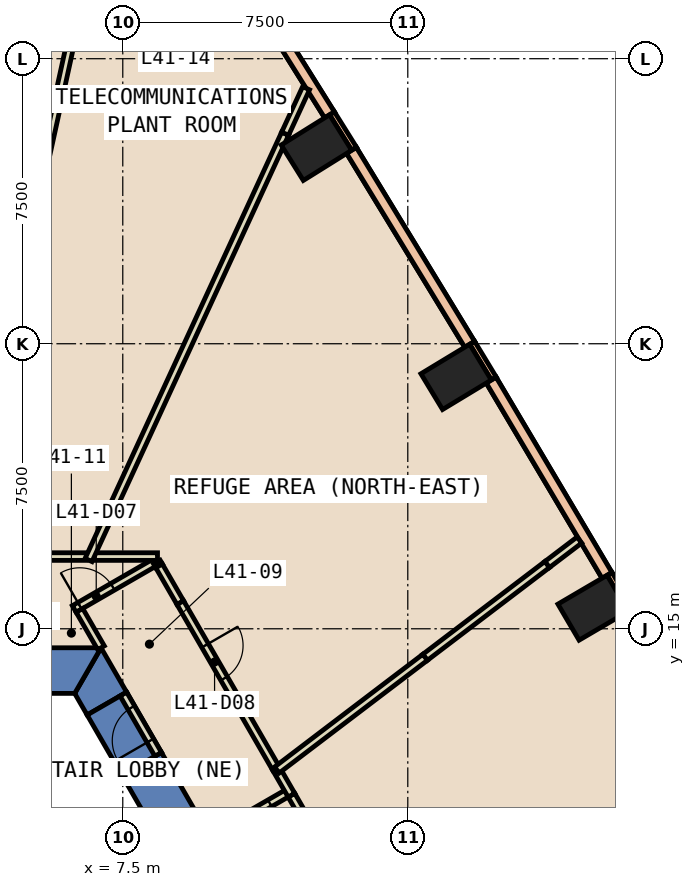
"""IFC4 building model, lengths in metres.
Left out: names, types, materials, properties, quantities, classifications, styles, units other than length and angle.
Written with IfcOpenShell. Run it as: python <this file> out.ifc"""

import sys

from ifc_helpers import new_model, si_unit, direction, frame, frame_2d, origin, origin_2d, place, context, subcontext, project, spatial, polyline, rectangle, outline, extrude, element, fill, save


model = new_model("IFC4")
c1 = context("Model", 3, precision=1e-05, world=origin(), true_north=direction((0.0, 1.0)))
c2 = subcontext(c1, "Body", "Model", "MODEL_VIEW")
j1 = project(units=[si_unit("LENGTHUNIT", "METRE"), si_unit("PLANEANGLEUNIT", "RADIAN")], contexts=[c1])
p1 = place(None, origin())
s1 = spatial("IfcSite", under=j1, at=p1, CompositionType="ELEMENT")
p2 = place(p1, origin())
s2 = spatial("IfcBuilding", under=s1, at=p2, CompositionType="ELEMENT")
p3 = place(p2, frame((0.0, 0.0, 184.4)))
s3 = spatial("IfcBuildingStorey", under=s2, at=p3, CompositionType="ELEMENT", Elevation=184.4)
for number, where, z_axis, x_axis in (
    (1, (19.876, 15.554, -0.6), (0.0, 0.0, 1.0), (-0.506, 0.863, 0.0)),
    (2, (16.272, 21.628, -0.6), (0.0, 0.0, 1.0), (-0.518, 0.855, 0.0)),
    (3, (12.596, 27.66, -0.6), (0.0, 0.0, 1.0), (-0.53, 0.848, 0.0)),
):
    element("IfcColumn", number, at=place(p3, frame(where, z_axis=z_axis, x_axis=x_axis)), inside=s3, PredefinedType="COLUMN", context=c2, shape_type="SweptSolid", body=[
        extrude(rectangle(XDim=1.1, YDim=1.5, at=origin_2d()), origin(), (0.0, 0.0, 1.0), 5.4),
    ])
p4 = place(p3, frame((0.0, 0.0, -0.6)))
e4 = element("IfcWall", 4, at=p4, inside=s3, PredefinedType="SHEAR", context=c2, shape_type="SweptSolid", body=[
    extrude(outline(polyline([(8.517, 11.747), (7.478, 11.147), (12.471, 2.5), (13.856, 2.5), (8.517, 11.747)])), origin(), (0.0, 0.0, 1.0), 5.4),
])
p5 = place(p3, frame((0.0, 0.0, -0.6)))
e5 = element("IfcWall", 5, at=p5, inside=s3, PredefinedType="SHEAR", context=c2, shape_type="SweptSolid", body=[
    extrude(outline(polyline([(6.563, 12.732), (7.602, 13.332), (6.928, 14.5), (6.235, 13.3), (6.563, 12.732)])), origin(), (0.0, 0.0, 1.0), 5.4),
])
p6 = place(p3, frame((0.0, 0.0, 3.6)))
e6 = element("IfcWall", 6, at=p6, inside=s3, PredefinedType="SHEAR", context=c2, shape_type="SweptSolid", body=[
    extrude(outline(polyline([(7.602, 13.332), (6.563, 12.732), (7.478, 11.147), (8.517, 11.747), (7.602, 13.332)])), origin(), (0.0, 0.0, 1.0), 1.2),
])
p7 = place(p3, frame((0.0, 0.0, -0.6)))
e7 = element("IfcWall", 7, at=p7, inside=s3, PredefinedType="SHEAR", context=c2, shape_type="SweptSolid", body=[
    extrude(outline(polyline([(6.928, 14.5), (-6.928, 14.5), (-6.235, 13.3), (6.235, 13.3), (6.928, 14.5)])), origin(), (0.0, 0.0, 1.0), 5.4),
])
p8 = place(p3, frame((20.866, 15.497, 0.0), z_axis=(0.0, 0.0, 1.0), x_axis=(-0.506505715302, 0.862236603472, 0.0)))
e8 = element("IfcWall", 8, at=p8, inside=s3, PredefinedType="STANDARD", context=c2, shape_type="SweptSolid", body=[
    extrude(rectangle(XDim=1.099, YDim=0.15, at=frame_2d((0.55, 0.0))), origin(), (0.0, 0.0, 1.0), 4.8),
])
for number, where, z_axis, x_axis in (
    (9, (17.263, 21.585, 0.0), (0.0, 0.0, 1.0), (-0.518, 0.855, 0.0)),
    (10, (13.587, 27.631, 0.0), (0.0, 0.0, 1.0), (-0.53, 0.848, 0.0)),
):
    element("IfcWall", number, at=place(p3, frame(where, z_axis=z_axis, x_axis=x_axis)), inside=s3, PredefinedType="STANDARD", context=c2, shape_type="SweptSolid", body=[
        extrude(rectangle(XDim=1.1, YDim=0.15, at=frame_2d((0.55, 0.0))), origin(), (0.0, 0.0, 1.0), 4.8),
    ])
p9 = place(p3, frame((20.242, 16.405, 0.0), z_axis=(0.0, 0.0, 1.0), x_axis=(-0.510120456318, 0.860102970606, 0.0)))
e11 = element("IfcWall", 11, at=p9, inside=s3, PredefinedType="STANDARD", context=c2, shape_type="SweptSolid", body=[
    extrude(rectangle(XDim=5.975, YDim=0.3, at=frame_2d((2.987, 0.0))), origin(), (0.0, 0.0, 1.0), 1.2),
])
p10 = place(p3, frame((20.242, 16.405, 4.0), z_axis=(0.0, 0.0, 1.0), x_axis=(-0.510120456318, 0.860102970606, 0.0)))
e12 = element("IfcWall", 12, at=p10, inside=s3, PredefinedType="STANDARD", context=c2, shape_type="SweptSolid", body=[
    extrude(rectangle(XDim=5.975, YDim=0.3, at=frame_2d((2.987, 0.0))), origin(), (0.0, 0.0, 1.0), 0.8),
])
p11 = place(p3, frame((16.628, 22.485, 0.0), z_axis=(0.0, 0.0, 1.0), x_axis=(-0.520441839765, 0.853897119928, 0.0)))
e13 = element("IfcWall", 13, at=p11, inside=s3, PredefinedType="STANDARD", context=c2, shape_type="SweptSolid", body=[
    extrude(rectangle(XDim=5.977, YDim=0.3, at=frame_2d((2.989, 0.0))), origin(), (0.0, 0.0, 1.0), 1.2),
])
p12 = place(p3, frame((16.628, 22.485, 4.0), z_axis=(0.0, 0.0, 1.0), x_axis=(-0.520441839765, 0.853897119928, 0.0)))
e14 = element("IfcWall", 14, at=p12, inside=s3, PredefinedType="STANDARD", context=c2, shape_type="SweptSolid", body=[
    extrude(rectangle(XDim=5.977, YDim=0.3, at=frame_2d((2.989, 0.0))), origin(), (0.0, 0.0, 1.0), 0.8),
])
p13 = place(p3, frame((12.94, 28.523, 0.0), z_axis=(0.0, 0.0, 1.0), x_axis=(-0.530698032758, 0.847560970094, 0.0)))
e15 = element("IfcWall", 15, at=p13, inside=s3, PredefinedType="STANDARD", context=c2, shape_type="SweptSolid", body=[
    extrude(rectangle(XDim=6.182, YDim=0.3, at=frame_2d((3.091, 0.0))), origin(), (0.0, 0.0, 1.0), 1.2),
])
p14 = place(p3, frame((12.94, 28.523, 4.0), z_axis=(0.0, 0.0, 1.0), x_axis=(-0.530698032758, 0.847560970094, 0.0)))
e16 = element("IfcWall", 16, at=p14, inside=s3, PredefinedType="STANDARD", context=c2, shape_type="SweptSolid", body=[
    extrude(rectangle(XDim=6.182, YDim=0.3, at=frame_2d((3.091, 0.0))), origin(), (0.0, 0.0, 1.0), 0.8),
])
p15 = place(p3, frame((11.888, 10.709, 0.0), z_axis=(0.0, 0.0, 1.0), x_axis=(-0.865973769406, -0.500089422704, 0.0)))
e17 = element("IfcWall", 17, at=p15, inside=s3, PredefinedType="PARTITIONING", context=c2, shape_type="SweptSolid", body=[
    extrude(rectangle(XDim=2.399, YDim=0.2, at=frame_2d((1.2, 0.0))), origin(), (0.0, 0.0, 1.0), 2.4),
])
p16 = place(p15, frame((0.6, 0.0, 0.0)))
e18 = element("IfcOpeningElement", 18, at=p16, cuts=e17, PredefinedType="OPENING", context=c2, shape_type="SweptSolid", body=[
    extrude(rectangle(XDim=1.0, YDim=2.1, at=frame_2d((0.5, 1.05))), frame((0.0, 0.11, 0.0), z_axis=(0.0, -1.0, 0.0), x_axis=(1.0, 0.0, 0.0)), (0.0, 0.0, 1.0), 0.22),
])
p17 = place(p3, frame((6.223, 15.521, 0.0), z_axis=(0.0, 0.0, 1.0), x_axis=(0.866022959057, 0.500004234368, 0.0)))
e19 = element("IfcWall", 19, at=p17, inside=s3, PredefinedType="PARTITIONING", context=c2, shape_type="SweptSolid", body=[
    extrude(rectangle(XDim=2.5, YDim=0.2, at=frame_2d((1.25, 0.0))), origin(), (0.0, 0.0, 1.0), 4.8),
])
p18 = place(p17, frame((0.168, 0.0, 0.0)))
e20 = element("IfcOpeningElement", 20, at=p18, cuts=e19, PredefinedType="OPENING", context=c2, shape_type="SweptSolid", body=[
    extrude(rectangle(XDim=1.0, YDim=2.1, at=frame_2d((0.5, 1.05))), frame((0.0, 0.11, 0.0), z_axis=(0.0, -1.0, 0.0), x_axis=(1.0, 0.0, 0.0)), (0.0, 0.0, 1.0), 0.22),
])
p19 = place(p3, frame((6.36, 15.484, 0.0), z_axis=(0.0, 0.0, 1.0), x_axis=(0.499883687939, -0.866092546171, 0.0)))
e21 = element("IfcWall", 21, at=p19, inside=s3, PredefinedType="PARTITIONING", context=c2, shape_type="SweptSolid", body=[
    extrude(rectangle(XDim=1.136, YDim=0.2, at=frame_2d((0.568, 0.0))), origin(), (0.0, 0.0, 1.0), 4.8),
])
p20 = place(p3, frame((8.398, 16.754, 0.0), z_axis=(0.0, 0.0, 1.0), x_axis=(0.500277597875, -0.865865073245, 0.0)))
e22 = element("IfcWall", 22, at=p20, inside=s3, PredefinedType="PARTITIONING", context=c2, shape_type="SweptSolid", body=[
    extrude(rectangle(XDim=0.114, YDim=0.2, at=frame_2d((0.057, 0.0))), origin(), (0.0, 0.0, 1.0), 4.8),
])
p21 = place(p3, frame((11.938, 10.622, 0.0), z_axis=(0.0, 0.0, 1.0), x_axis=(0.500069357699, -0.865985356395, 0.0)))
e23 = element("IfcWall", 23, at=p21, inside=s3, PredefinedType="PARTITIONING", context=c2, shape_type="SweptSolid", body=[
    extrude(rectangle(XDim=5.137, YDim=0.2, at=frame_2d((2.569, 0.0))), origin(), (0.0, 0.0, 1.0), 2.4),
])
p22 = place(p3, frame((6.741, 16.9, 0.0), z_axis=(0.0, 0.0, 1.0), x_axis=(1.0, 0.0, 0.0)))
e24 = element("IfcWall", 24, at=p22, inside=s3, PredefinedType="PARTITIONING", context=c2, shape_type="SweptSolid", body=[
    extrude(rectangle(XDim=1.673, YDim=0.2, at=frame_2d((0.836, 0.0))), origin(), (0.0, 0.0, 1.0), 4.8),
])
p23 = place(p3, frame((3.26, 16.9, 0.0), z_axis=(0.0, 0.0, 1.0), x_axis=(1.0, 0.0, 0.0)))
e25 = element("IfcWall", 25, at=p23, inside=s3, PredefinedType="PARTITIONING", context=c2, shape_type="SweptSolid", body=[
    extrude(rectangle(XDim=3.281, YDim=0.2, at=frame_2d((1.641, 0.0))), origin(), (0.0, 0.0, 1.0), 4.8),
])
p24 = place(p23, frame((1.103, 0.0, 0.0)))
e26 = element("IfcOpeningElement", 26, at=p24, cuts=e25, PredefinedType="OPENING", context=c2, shape_type="SweptSolid", body=[
    extrude(rectangle(XDim=1.0, YDim=2.1, at=frame_2d((0.5, 1.05))), frame((0.0, 0.11, 0.0), z_axis=(0.0, -1.0, 0.0), x_axis=(1.0, 0.0, 0.0)), (0.0, 0.0, 1.0), 0.22),
])
p25 = place(p3, frame((19.516, 17.336, 0.0), z_axis=(0.0, 0.0, 1.0), x_axis=(-0.796197442737, -0.605036884974, 0.0)))
e27 = element("IfcWall", 27, at=p25, inside=s3, PredefinedType="PARTITIONING", context=c2, shape_type="SweptSolid", body=[
    extrude(rectangle(XDim=1.068, YDim=0.2, at=frame_2d((0.534, 0.0))), origin(), (0.0, 0.0, 1.0), 2.4),
])
p26 = place(p3, frame((6.599, 16.809, 0.0), z_axis=(0.0, 0.0, 1.0), x_axis=(0.418744831877, 0.908103939963, 0.0)))
e28 = element("IfcWall", 28, at=p26, inside=s3, PredefinedType="PARTITIONING", context=c2, shape_type="SweptSolid", body=[
    extrude(rectangle(XDim=12.353, YDim=0.2, at=frame_2d((6.177, 0.0))), origin(), (0.0, 0.0, 1.0), 4.8),
])
p27 = place(p3, frame((3.139, 16.802, 0.0), z_axis=(0.0, 0.0, 1.0), x_axis=(0.214411540921, 0.976743411096, 0.0)))
e29 = element("IfcWall", 29, at=p27, inside=s3, PredefinedType="PARTITIONING", context=c2, shape_type="SweptSolid", body=[
    extrude(rectangle(XDim=20.069, YDim=0.2, at=frame_2d((10.034, 0.0))), origin(), (0.0, 0.0, 1.0), 4.8),
])
p28 = place(p3, frame((8.431, 11.698, 0.0), z_axis=(0.0, 0.0, 1.0), x_axis=(-0.500115259676, 0.865958848352, 0.0)))
e30 = element("IfcWall", 30, at=p28, inside=s3, PredefinedType="PARTITIONING", context=c2, shape_type="SweptSolid", body=[
    extrude(rectangle(XDim=1.829, YDim=0.2, at=frame_2d((0.915, 0.0))), origin(), (0.0, 0.0, 1.0), 2.4),
])
p29 = place(p28, frame((0.415, 0.0, 0.0)))
e31 = element("IfcOpeningElement", 31, at=p29, cuts=e30, PredefinedType="OPENING", context=c2, shape_type="SweptSolid", body=[
    extrude(rectangle(XDim=1.0, YDim=2.1, at=frame_2d((0.5, 1.05))), frame((0.0, 0.11, 0.0), z_axis=(0.0, -1.0, 0.0), x_axis=(1.0, 0.0, 0.0)), (0.0, 0.0, 1.0), 0.22),
])
p30 = place(p3, frame((8.455, 16.655, 0.0), z_axis=(0.0, 0.0, 1.0), x_axis=(0.499968249168, -0.86604373436, 0.0)))
e32 = element("IfcWall", 32, at=p30, inside=s3, PredefinedType="PARTITIONING", context=c2, shape_type="SweptSolid", body=[
    extrude(rectangle(XDim=1.118, YDim=0.2, at=frame_2d((0.559, 0.0))), origin(), (0.0, 0.0, 1.0), 2.4),
])
p31 = place(p3, frame((9.014, 15.687, 0.0), z_axis=(0.0, 0.0, 1.0), x_axis=(0.499967322677, -0.866044269224, 0.0)))
e33 = element("IfcWall", 33, at=p31, inside=s3, PredefinedType="PARTITIONING", context=c2, shape_type="SweptSolid", body=[
    extrude(rectangle(XDim=5.034, YDim=0.2, at=frame_2d((2.517, 0.0))), origin(), (0.0, 0.0, 1.0), 4.8),
])
p32 = place(p31, frame((1.303, 0.0, 0.0)))
e34 = element("IfcOpeningElement", 34, at=p32, cuts=e33, PredefinedType="OPENING", context=c2, shape_type="SweptSolid", body=[
    extrude(rectangle(XDim=1.0, YDim=2.1, at=frame_2d((0.5, 1.05))), frame((0.0, 0.11, 0.0), z_axis=(0.0, -1.0, 0.0), x_axis=(1.0, 0.0, 0.0)), (0.0, 0.0, 1.0), 0.22),
])
p33 = place(p3, frame((11.531, 11.327, 0.0), z_axis=(0.0, 0.0, 1.0), x_axis=(0.500042693391, -0.866000753341, 0.0)))
e35 = element("IfcWall", 35, at=p33, inside=s3, PredefinedType="PARTITIONING", context=c2, shape_type="SweptSolid", body=[
    extrude(rectangle(XDim=0.814, YDim=0.2, at=frame_2d((0.407, 0.0))), origin(), (0.0, 0.0, 1.0), 2.4),
])
p34 = place(p3, frame((18.666, 16.69, 0.0), z_axis=(0.0, 0.0, 1.0), x_axis=(-0.796089871725, -0.605178416781, 0.0)))
e36 = element("IfcWall", 36, at=p34, inside=s3, PredefinedType="PARTITIONING", context=c2, shape_type="SweptSolid", body=[
    extrude(rectangle(XDim=4.033, YDim=0.2, at=frame_2d((2.017, 0.0))), origin(), (0.0, 0.0, 1.0), 4.8),
])
p35 = place(p3, frame((15.455, 14.249, 0.0), z_axis=(0.0, 0.0, 1.0), x_axis=(-0.796089188828, -0.605179315106, 0.0)))
e37 = element("IfcWall", 37, at=p35, inside=s3, PredefinedType="PARTITIONING", context=c2, shape_type="SweptSolid", body=[
    extrude(rectangle(XDim=4.898, YDim=0.2, at=frame_2d((2.449, 0.0))), origin(), (0.0, 0.0, 1.0), 2.4),
])
p36 = place(p3, frame((11.772, 28.027, 0.0), z_axis=(0.0, 0.0, 1.0), x_axis=(0.418764526631, 0.90809485806, 0.0)))
e38 = element("IfcWall", 38, at=p36, inside=s3, PredefinedType="PARTITIONING", context=c2, shape_type="SweptSolid", body=[
    extrude(rectangle(XDim=1.318, YDim=0.2, at=frame_2d((0.659, 0.0))), origin(), (0.0, 0.0, 1.0), 2.4),
])
p37 = place(p16, origin())
e39 = element("IfcDoor", 39, at=p37, inside=s3, OperationType="SINGLE_SWING_RIGHT", PredefinedType="DOOR", context=c2, shape_type="SweptSolid", body=[
    extrude(rectangle(XDim=1.0, YDim=2.1, at=frame_2d((0.5, 1.05))), frame((0.0, 0.025, 0.0), z_axis=(0.0, -1.0, 0.0), x_axis=(1.0, 0.0, 0.0)), (0.0, 0.0, 1.0), 0.05),
])
fill(e18, e39)
p38 = place(p18, origin())
e40 = element("IfcDoor", 40, at=p38, inside=s3, OperationType="SINGLE_SWING_LEFT", PredefinedType="DOOR", context=c2, shape_type="SweptSolid", body=[
    extrude(rectangle(XDim=1.0, YDim=2.1, at=frame_2d((0.5, 1.05))), frame((0.0, 0.025, 0.0), z_axis=(0.0, -1.0, 0.0), x_axis=(1.0, 0.0, 0.0)), (0.0, 0.0, 1.0), 0.05),
])
fill(e20, e40)
p39 = place(p32, origin())
e41 = element("IfcDoor", 41, at=p39, inside=s3, OperationType="SINGLE_SWING_RIGHT", PredefinedType="DOOR", context=c2, shape_type="SweptSolid", body=[
    extrude(rectangle(XDim=1.0, YDim=2.1, at=frame_2d((0.5, 1.05))), frame((0.0, 0.025, 0.0), z_axis=(0.0, -1.0, 0.0), x_axis=(1.0, 0.0, 0.0)), (0.0, 0.0, 1.0), 0.05),
])
fill(e34, e41)
p40 = place(p29, origin())
e42 = element("IfcDoor", 42, at=p40, inside=s3, OperationType="SINGLE_SWING_LEFT", PredefinedType="DOOR", context=c2, shape_type="SweptSolid", body=[
    extrude(rectangle(XDim=1.0, YDim=2.1, at=frame_2d((0.5, 1.05))), frame((0.0, 0.025, 0.0), z_axis=(0.0, -1.0, 0.0), x_axis=(1.0, 0.0, 0.0)), (0.0, 0.0, 1.0), 0.05),
])
fill(e31, e42)
save(model, sys.argv[1])
